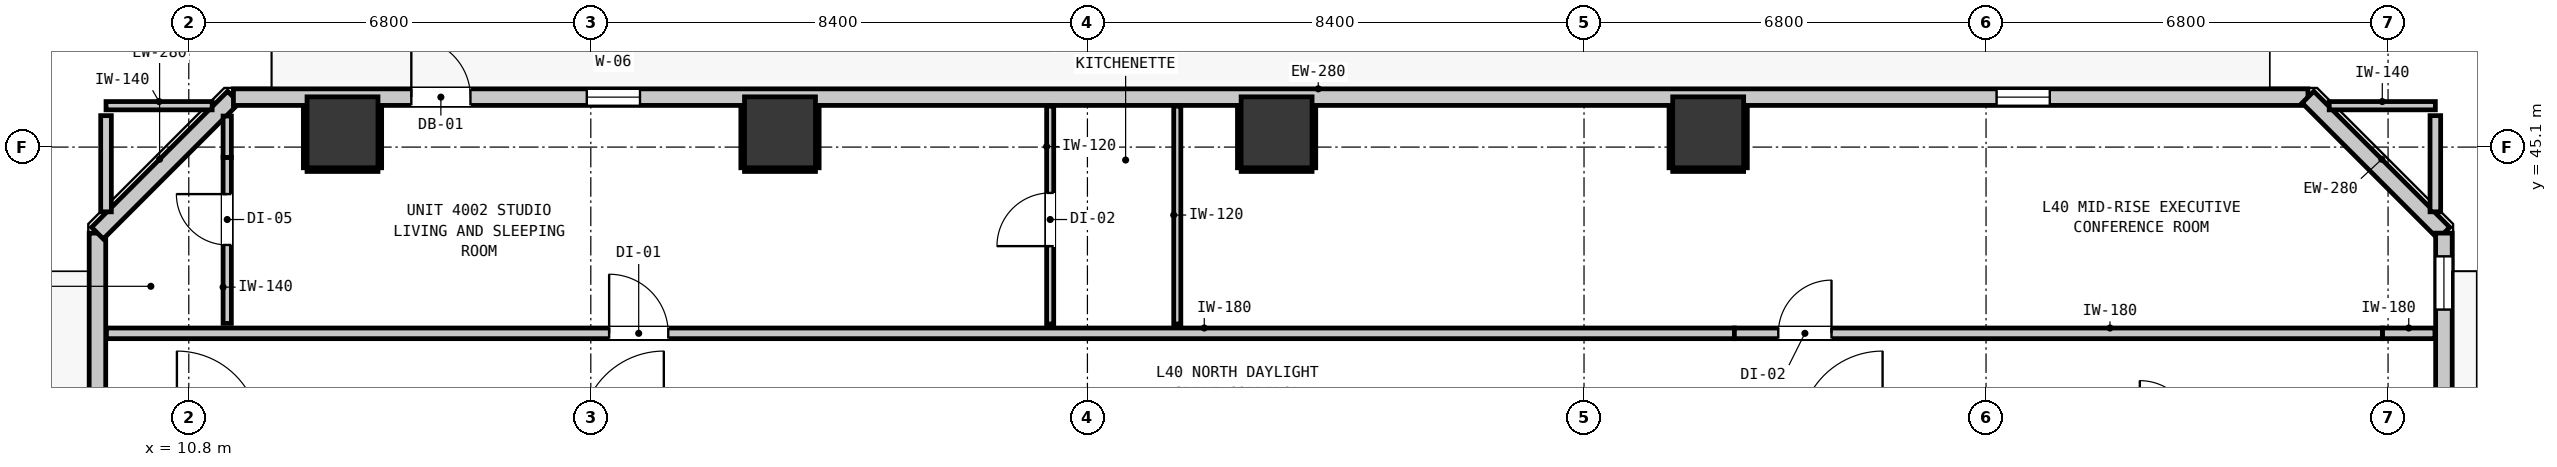
"""IFC4 building model, lengths in metres.
Left out: names, types, materials, properties, quantities, classifications, styles, units other than length and angle.
Written with IfcOpenShell. Run it as: python <this file> out.ifc"""

import sys

from ifc_helpers import new_model, si_unit, direction, frame, frame_2d, origin, origin_2d, place, context, subcontext, project, spatial, rectangle, extrude, element, fill, save


model = new_model("IFC4")
c1 = context("Model", 3, precision=1e-05, world=origin(), true_north=direction((0.0, 1.0)))
c2 = subcontext(c1, "Body", "Model", "MODEL_VIEW")
j1 = project(units=[si_unit("LENGTHUNIT", "METRE"), si_unit("PLANEANGLEUNIT", "RADIAN")], contexts=[c1])
p1 = place(None, origin())
s1 = spatial("IfcSite", under=j1, at=p1, CompositionType="ELEMENT")
p2 = place(p1, origin())
s2 = spatial("IfcBuilding", under=s1, at=p2, CompositionType="ELEMENT")
p3 = place(p2, frame((0.0, 0.0, 139.28)))
s3 = spatial("IfcBuildingStorey", under=s2, at=p3, CompositionType="ELEMENT", Elevation=139.28)
for number, where, z_axis, x_axis in (
    (1, (13.4, 45.35, 0.0), (0.0, 0.0, 1.0), (1.0, 0.0, 0.0)),
    (2, (20.8, 45.35, 0.0), (0.0, 0.0, 1.0), (1.0, 0.0, 0.0)),
    (3, (29.2, 45.35, 0.0), (0.0, 0.0, 1.0), (1.0, 0.0, 0.0)),
    (4, (36.5, 45.35, 0.0), (0.0, 0.0, 1.0), (1.0, 0.0, 0.0)),
):
    element("IfcColumn", number, at=place(p3, frame(where, z_axis=z_axis, x_axis=x_axis)), inside=s3, PredefinedType="COLUMN", context=c2, shape_type="SweptSolid", body=[
        extrude(rectangle(XDim=1.2, YDim=1.2, at=origin_2d()), origin(), (0.0, 0.0, 1.0), 3.32),
    ])
p4 = place(p3, frame((9.255, 11.355, 0.0), z_axis=(0.0, 0.0, 1.0), x_axis=(0.0, 1.0, 0.0)))
e5 = element("IfcWall", 5, at=p4, inside=s3, PredefinedType="STANDARD", context=c2, shape_type="SweptSolid", body=[
    extrude(rectangle(XDim=32.29, YDim=0.28, at=frame_2d((16.145, 0.0))), origin(), (0.0, 0.0, 1.0), 3.08),
])
p5 = place(p4, frame((5.818, 0.0, 0.0)))
e6 = element("IfcOpeningElement", 6, at=p5, cuts=e5, PredefinedType="OPENING", context=c2, shape_type="SweptSolid", body=[
    extrude(rectangle(XDim=1.0, YDim=2.15, at=frame_2d((0.5, 1.075))), frame((0.0, 0.15, 0.0), z_axis=(0.0, -1.0, 0.0), x_axis=(1.0, 0.0, 0.0)), (0.0, 0.0, 1.0), 0.3),
])
p6 = place(p4, frame((0.619, 0.0, 0.85)))
e7 = element("IfcOpeningElement", 7, at=p6, cuts=e5, PredefinedType="OPENING", context=c2, shape_type="SweptSolid", body=[
    extrude(rectangle(XDim=0.9, YDim=1.5, at=frame_2d((0.45, 0.75))), frame((0.0, 0.15, 0.0), z_axis=(0.0, -1.0, 0.0), x_axis=(1.0, 0.0, 0.0)), (0.0, 0.0, 1.0), 0.3),
])
p7 = place(p3, frame((9.255, 43.645, 0.0), z_axis=(0.0, 0.0, 1.0), x_axis=(0.707106781187, 0.707106781187, 0.0)))
e8 = element("IfcWall", 8, at=p7, inside=s3, PredefinedType="STANDARD", context=c2, shape_type="SweptSolid", body=[
    extrude(rectangle(XDim=3.253, YDim=0.28, at=frame_2d((1.626, 0.0))), origin(), (0.0, 0.0, 1.0), 3.08),
])
p8 = place(p3, frame((11.555, 45.945, 0.0), z_axis=(0.0, 0.0, 1.0), x_axis=(1.0, 0.0, 0.0)))
e9 = element("IfcWall", 9, at=p8, inside=s3, PredefinedType="STANDARD", context=c2, shape_type="SweptSolid", body=[
    extrude(rectangle(XDim=35.09, YDim=0.28, at=frame_2d((17.545, 0.0))), origin(), (0.0, 0.0, 1.0), 3.08),
])
p9 = place(p8, frame((3.009, 0.0, 0.0)))
e10 = element("IfcOpeningElement", 10, at=p9, cuts=e9, PredefinedType="OPENING", context=c2, shape_type="SweptSolid", body=[
    extrude(rectangle(XDim=1.0, YDim=2.15, at=frame_2d((0.5, 1.075))), frame((0.0, 0.15, 0.0), z_axis=(0.0, -1.0, 0.0), x_axis=(1.0, 0.0, 0.0)), (0.0, 0.0, 1.0), 0.3),
])
p10 = place(p8, frame((5.977, 0.0, 0.85)))
e11 = element("IfcOpeningElement", 11, at=p10, cuts=e9, PredefinedType="OPENING", context=c2, shape_type="SweptSolid", body=[
    extrude(rectangle(XDim=0.9, YDim=1.5, at=frame_2d((0.45, 0.75))), frame((0.0, 0.15, 0.0), z_axis=(0.0, -1.0, 0.0), x_axis=(1.0, 0.0, 0.0)), (0.0, 0.0, 1.0), 0.3),
])
p11 = place(p8, frame((29.823, 0.0, 0.85)))
e12 = element("IfcOpeningElement", 12, at=p11, cuts=e9, PredefinedType="OPENING", context=c2, shape_type="SweptSolid", body=[
    extrude(rectangle(XDim=0.9, YDim=1.5, at=frame_2d((0.45, 0.75))), frame((0.0, 0.15, 0.0), z_axis=(0.0, -1.0, 0.0), x_axis=(1.0, 0.0, 0.0)), (0.0, 0.0, 1.0), 0.3),
])
p12 = place(p3, frame((46.645, 45.945, 0.0), z_axis=(0.0, 0.0, 1.0), x_axis=(0.707106781187, -0.707106781187, 0.0)))
e13 = element("IfcWall", 13, at=p12, inside=s3, PredefinedType="STANDARD", context=c2, shape_type="SweptSolid", body=[
    extrude(rectangle(XDim=3.253, YDim=0.28, at=frame_2d((1.626, 0.0))), origin(), (0.0, 0.0, 1.0), 3.08),
])
p13 = place(p3, frame((48.945, 43.645, 0.0), z_axis=(0.0, 0.0, 1.0), x_axis=(0.0, -1.0, 0.0)))
e14 = element("IfcWall", 14, at=p13, inside=s3, PredefinedType="STANDARD", context=c2, shape_type="SweptSolid", body=[
    extrude(rectangle(XDim=32.29, YDim=0.28, at=frame_2d((16.145, 0.0))), origin(), (0.0, 0.0, 1.0), 3.08),
])
p14 = place(p13, frame((5.467, 0.0, 0.0)))
e15 = element("IfcOpeningElement", 15, at=p14, cuts=e14, PredefinedType="OPENING", context=c2, shape_type="SweptSolid", body=[
    extrude(rectangle(XDim=1.0, YDim=2.15, at=frame_2d((0.5, 1.075))), frame((0.0, 0.15, 0.0), z_axis=(0.0, -1.0, 0.0), x_axis=(1.0, 0.0, 0.0)), (0.0, 0.0, 1.0), 0.3),
])
p15 = place(p13, frame((29.148, 0.0, 0.85)))
e16 = element("IfcOpeningElement", 16, at=p15, cuts=e14, PredefinedType="OPENING", context=c2, shape_type="SweptSolid", body=[
    extrude(rectangle(XDim=0.9, YDim=1.5, at=frame_2d((0.45, 0.75))), frame((0.0, 0.15, 0.0), z_axis=(0.0, -1.0, 0.0), x_axis=(1.0, 0.0, 0.0)), (0.0, 0.0, 1.0), 0.3),
])
p16 = place(p13, frame((0.393, 0.0, 0.85)))
e17 = element("IfcOpeningElement", 17, at=p16, cuts=e14, PredefinedType="OPENING", context=c2, shape_type="SweptSolid", body=[
    extrude(rectangle(XDim=0.9, YDim=1.5, at=frame_2d((0.45, 0.75))), frame((0.0, 0.15, 0.0), z_axis=(0.0, -1.0, 0.0), x_axis=(1.0, 0.0, 0.0)), (0.0, 0.0, 1.0), 0.3),
])
p17 = place(p13, frame((16.276, 0.0, 0.85)))
e18 = element("IfcOpeningElement", 18, at=p17, cuts=e14, PredefinedType="OPENING", context=c2, shape_type="SweptSolid", body=[
    extrude(rectangle(XDim=0.9, YDim=1.5, at=frame_2d((0.45, 0.75))), frame((0.0, 0.15, 0.0), z_axis=(0.0, -1.0, 0.0), x_axis=(1.0, 0.0, 0.0)), (0.0, 0.0, 1.0), 0.3),
])
p18 = place(p13, frame((10.645, 0.0, 0.85)))
e19 = element("IfcOpeningElement", 19, at=p18, cuts=e14, PredefinedType="OPENING", context=c2, shape_type="SweptSolid", body=[
    extrude(rectangle(XDim=0.9, YDim=1.5, at=frame_2d((0.45, 0.75))), frame((0.0, 0.15, 0.0), z_axis=(0.0, -1.0, 0.0), x_axis=(1.0, 0.0, 0.0)), (0.0, 0.0, 1.0), 0.3),
])
p19 = place(p3, frame((9.407, 41.95, 0.0), z_axis=(0.0, 0.0, 1.0), x_axis=(1.0, 0.0, 0.0)))
e20 = element("IfcWall", 20, at=p19, inside=s3, PredefinedType="PARTITIONING", context=c2, shape_type="SweptSolid", body=[
    extrude(rectangle(XDim=27.536, YDim=0.18, at=frame_2d((13.768, 0.0))), origin(), (0.0, 0.0, 1.0), 3.08),
])
p20 = place(p19, frame((8.503, 0.0, 0.0)))
e21 = element("IfcOpeningElement", 21, at=p20, cuts=e20, PredefinedType="OPENING", context=c2, shape_type="SweptSolid", body=[
    extrude(rectangle(XDim=1.0, YDim=2.15, at=frame_2d((0.5, 1.075))), frame((0.0, 0.1, 0.0), z_axis=(0.0, -1.0, 0.0), x_axis=(1.0, 0.0, 0.0)), (0.0, 0.0, 1.0), 0.2),
])
p21 = place(p3, frame((36.943, 41.95, 0.0), z_axis=(0.0, 0.0, 1.0), x_axis=(1.0, 0.0, 0.0)))
e22 = element("IfcWall", 22, at=p21, inside=s3, PredefinedType="PARTITIONING", context=c2, shape_type="SweptSolid", body=[
    extrude(rectangle(XDim=10.964, YDim=0.18, at=frame_2d((5.482, 0.0))), origin(), (0.0, 0.0, 1.0), 2.565),
])
p22 = place(p21, frame((0.743, 0.0, 0.0)))
e23 = element("IfcOpeningElement", 23, at=p22, cuts=e22, PredefinedType="OPENING", context=c2, shape_type="SweptSolid", body=[
    extrude(rectangle(XDim=0.9, YDim=2.1, at=frame_2d((0.45, 1.05))), frame((0.0, 0.1, 0.0), z_axis=(0.0, -1.0, 0.0), x_axis=(1.0, 0.0, 0.0)), (0.0, 0.0, 1.0), 0.2),
])
p23 = place(p3, frame((47.907, 41.95, 0.0), z_axis=(0.0, 0.0, 1.0), x_axis=(1.0, 0.0, 0.0)))
e24 = element("IfcWall", 24, at=p23, inside=s3, PredefinedType="PARTITIONING", context=c2, shape_type="SweptSolid", body=[
    extrude(rectangle(XDim=0.886, YDim=0.18, at=frame_2d((0.443, 0.0))), origin(), (0.0, 0.0, 1.0), 3.08),
])
for number, where, z_axis, x_axis in (
    (25, (9.4, 45.8, 0.0), (0.0, 0.0, 1.0), (1.0, 0.0, 0.0)),
    (26, (47.005, 45.8, 0.0), (0.0, 0.0, 1.0), (1.0, 0.0, 0.0)),
):
    element("IfcWall", number, at=place(p3, frame(where, z_axis=z_axis, x_axis=x_axis)), inside=s3, PredefinedType="PARTITIONING", context=c2, shape_type="SweptSolid", body=[
        extrude(rectangle(XDim=1.795, YDim=0.14, at=frame_2d((0.897, 0.0))), origin(), (0.0, 0.0, 1.0), 3.08),
    ])
for number, where, z_axis, x_axis in (
    (27, (9.4, 44.005, 0.0), (0.0, 0.0, 1.0), (0.0, 1.0, 0.0)),
    (28, (48.8, 44.005, 0.0), (0.0, 0.0, 1.0), (0.0, 1.0, 0.0)),
):
    element("IfcWall", number, at=place(p3, frame(where, z_axis=z_axis, x_axis=x_axis)), inside=s3, PredefinedType="PARTITIONING", context=c2, shape_type="SweptSolid", body=[
        extrude(rectangle(XDim=1.627, YDim=0.18, at=frame_2d((0.813, 0.0))), origin(), (0.0, 0.0, 1.0), 3.08),
    ])
p24 = place(p3, frame((11.45, 42.118, 0.0), z_axis=(0.0, 0.0, 1.0), x_axis=(0.0, 1.0, 0.0)))
e29 = element("IfcWall", 29, at=p24, inside=s3, PredefinedType="PARTITIONING", context=c2, shape_type="SweptSolid", body=[
    extrude(rectangle(XDim=2.808, YDim=0.14, at=frame_2d((1.404, 0.0))), origin(), (0.0, 0.0, 1.0), 2.565),
])
p25 = place(p24, frame((1.327, 0.0, 0.0)))
e30 = element("IfcOpeningElement", 30, at=p25, cuts=e29, PredefinedType="OPENING", context=c2, shape_type="SweptSolid", body=[
    extrude(rectangle(XDim=0.86, YDim=2.02, at=frame_2d((0.43, 1.01))), frame((0.0, 0.08, 0.0), z_axis=(0.0, -1.0, 0.0), x_axis=(1.0, 0.0, 0.0)), (0.0, 0.0, 1.0), 0.16),
])
p26 = place(p3, frame((11.45, 44.926, 0.0), z_axis=(0.0, 0.0, 1.0), x_axis=(0.0, 1.0, 0.0)))
e31 = element("IfcWall", 31, at=p26, inside=s3, PredefinedType="PARTITIONING", context=c2, shape_type="SweptSolid", body=[
    extrude(rectangle(XDim=0.699, YDim=0.14, at=frame_2d((0.35, 0.0))), origin(), (0.0, 0.0, 1.0), 3.08),
])
p27 = place(p3, frame((25.37, 42.108, 0.0), z_axis=(0.0, 0.0, 1.0), x_axis=(0.0, 1.0, 0.0)))
e32 = element("IfcWall", 32, at=p27, inside=s3, PredefinedType="PARTITIONING", context=c2, shape_type="SweptSolid", body=[
    extrude(rectangle(XDim=3.685, YDim=0.12, at=frame_2d((1.843, 0.0))), origin(), (0.0, 0.0, 1.0), 3.08),
])
p28 = place(p27, frame((1.317, 0.0, 0.0)))
e33 = element("IfcOpeningElement", 33, at=p28, cuts=e32, PredefinedType="OPENING", context=c2, shape_type="SweptSolid", body=[
    extrude(rectangle(XDim=0.9, YDim=2.1, at=frame_2d((0.45, 1.05))), frame((0.0, 0.07, 0.0), z_axis=(0.0, -1.0, 0.0), x_axis=(1.0, 0.0, 0.0)), (0.0, 0.0, 1.0), 0.14),
])
p29 = place(p3, frame((27.52, 42.108, 0.0), z_axis=(0.0, 0.0, 1.0), x_axis=(0.0, 1.0, 0.0)))
e34 = element("IfcWall", 34, at=p29, inside=s3, PredefinedType="PARTITIONING", context=c2, shape_type="SweptSolid", body=[
    extrude(rectangle(XDim=3.685, YDim=0.12, at=frame_2d((1.843, 0.0))), origin(), (0.0, 0.0, 1.0), 3.08),
])
p30 = place(p3, frame((12.8, 44.718, 0.0), z_axis=(0.0, 0.0, 1.0), x_axis=(1.0, 0.0, 0.0)))
e35 = element("IfcWall", 35, at=p30, inside=s3, PredefinedType="PARTITIONING", context=c2, shape_type="SweptSolid", body=[
    extrude(rectangle(XDim=1.2, YDim=0.06, at=frame_2d((0.6, 0.0))), origin(), (0.0, 0.0, 1.0), 1.45),
])
for number, where, z_axis, x_axis in (
    (36, (12.768, 44.75, 0.0), (0.0, 0.0, 1.0), (0.0, 1.0, 0.0)),
    (37, (14.032, 44.75, 0.0), (0.0, 0.0, 1.0), (0.0, 1.0, 0.0)),
):
    element("IfcWall", number, at=place(p3, frame(where, z_axis=z_axis, x_axis=x_axis)), inside=s3, PredefinedType="PARTITIONING", context=c2, shape_type="SweptSolid", body=[
        extrude(rectangle(XDim=1.04, YDim=0.06, at=frame_2d((0.52, 0.0))), origin(), (0.0, 0.0, 1.0), 1.45),
    ])
p31 = place(p3, frame((20.2, 44.718, 0.0), z_axis=(0.0, 0.0, 1.0), x_axis=(1.0, 0.0, 0.0)))
e38 = element("IfcWall", 38, at=p31, inside=s3, PredefinedType="PARTITIONING", context=c2, shape_type="SweptSolid", body=[
    extrude(rectangle(XDim=1.2, YDim=0.06, at=frame_2d((0.6, 0.0))), origin(), (0.0, 0.0, 1.0), 1.45),
])
for number, where, z_axis, x_axis in (
    (39, (20.168, 44.75, 0.0), (0.0, 0.0, 1.0), (0.0, 1.0, 0.0)),
    (40, (21.432, 44.75, 0.0), (0.0, 0.0, 1.0), (0.0, 1.0, 0.0)),
):
    element("IfcWall", number, at=place(p3, frame(where, z_axis=z_axis, x_axis=x_axis)), inside=s3, PredefinedType="PARTITIONING", context=c2, shape_type="SweptSolid", body=[
        extrude(rectangle(XDim=1.04, YDim=0.06, at=frame_2d((0.52, 0.0))), origin(), (0.0, 0.0, 1.0), 1.45),
    ])
p32 = place(p3, frame((28.6, 44.718, 0.0), z_axis=(0.0, 0.0, 1.0), x_axis=(1.0, 0.0, 0.0)))
e41 = element("IfcWall", 41, at=p32, inside=s3, PredefinedType="PARTITIONING", context=c2, shape_type="SweptSolid", body=[
    extrude(rectangle(XDim=1.2, YDim=0.06, at=frame_2d((0.6, 0.0))), origin(), (0.0, 0.0, 1.0), 1.45),
])
for number, where, z_axis, x_axis in (
    (42, (28.568, 44.75, 0.0), (0.0, 0.0, 1.0), (0.0, 1.0, 0.0)),
    (43, (29.832, 44.75, 0.0), (0.0, 0.0, 1.0), (0.0, 1.0, 0.0)),
):
    element("IfcWall", number, at=place(p3, frame(where, z_axis=z_axis, x_axis=x_axis)), inside=s3, PredefinedType="PARTITIONING", context=c2, shape_type="SweptSolid", body=[
        extrude(rectangle(XDim=1.04, YDim=0.06, at=frame_2d((0.52, 0.0))), origin(), (0.0, 0.0, 1.0), 1.45),
    ])
p33 = place(p3, frame((35.9, 44.718, 0.0), z_axis=(0.0, 0.0, 1.0), x_axis=(1.0, 0.0, 0.0)))
e44 = element("IfcWall", 44, at=p33, inside=s3, PredefinedType="PARTITIONING", context=c2, shape_type="SweptSolid", body=[
    extrude(rectangle(XDim=1.2, YDim=0.06, at=frame_2d((0.6, 0.0))), origin(), (0.0, 0.0, 1.0), 1.45),
])
for number, where, z_axis, x_axis in (
    (45, (35.868, 44.75, 0.0), (0.0, 0.0, 1.0), (0.0, 1.0, 0.0)),
    (46, (37.132, 44.75, 0.0), (0.0, 0.0, 1.0), (0.0, 1.0, 0.0)),
):
    element("IfcWall", number, at=place(p3, frame(where, z_axis=z_axis, x_axis=x_axis)), inside=s3, PredefinedType="PARTITIONING", context=c2, shape_type="SweptSolid", body=[
        extrude(rectangle(XDim=1.04, YDim=0.06, at=frame_2d((0.52, 0.0))), origin(), (0.0, 0.0, 1.0), 1.45),
    ])
p34 = place(p9, origin())
e47 = element("IfcDoor", 47, at=p34, inside=s3, OperationType="SINGLE_SWING_LEFT", PredefinedType="DOOR", context=c2, shape_type="SweptSolid", body=[
    extrude(rectangle(XDim=1.0, YDim=2.15, at=frame_2d((0.5, 1.075))), frame((0.0, 0.025, 0.0), z_axis=(0.0, -1.0, 0.0), x_axis=(1.0, 0.0, 0.0)), (0.0, 0.0, 1.0), 0.05),
])
fill(e10, e47)
p35 = place(p10, origin())
e48 = element("IfcWindow", 48, at=p35, inside=s3, PartitioningType="SINGLE_PANEL", PredefinedType="WINDOW", context=c2, shape_type="SweptSolid", body=[
    extrude(rectangle(XDim=0.9, YDim=1.5, at=frame_2d((0.45, 0.75))), frame((0.0, 0.03, 0.0), z_axis=(0.0, -1.0, 0.0), x_axis=(1.0, 0.0, 0.0)), (0.0, 0.0, 1.0), 0.06),
])
fill(e11, e48)
p36 = place(p11, origin())
e49 = element("IfcWindow", 49, at=p36, inside=s3, PartitioningType="SINGLE_PANEL", PredefinedType="WINDOW", context=c2, shape_type="SweptSolid", body=[
    extrude(rectangle(XDim=0.9, YDim=1.5, at=frame_2d((0.45, 0.75))), frame((0.0, 0.03, 0.0), z_axis=(0.0, -1.0, 0.0), x_axis=(1.0, 0.0, 0.0)), (0.0, 0.0, 1.0), 0.06),
])
fill(e12, e49)
p37 = place(p16, origin())
e50 = element("IfcWindow", 50, at=p37, inside=s3, PartitioningType="SINGLE_PANEL", PredefinedType="WINDOW", context=c2, shape_type="SweptSolid", body=[
    extrude(rectangle(XDim=0.9, YDim=1.5, at=frame_2d((0.45, 0.75))), frame((0.0, 0.03, 0.0), z_axis=(0.0, -1.0, 0.0), x_axis=(1.0, 0.0, 0.0)), (0.0, 0.0, 1.0), 0.06),
])
fill(e17, e50)
p38 = place(p20, origin())
e51 = element("IfcDoor", 51, at=p38, inside=s3, OperationType="SINGLE_SWING_LEFT", PredefinedType="DOOR", context=c2, shape_type="SweptSolid", body=[
    extrude(rectangle(XDim=1.0, YDim=2.15, at=frame_2d((0.5, 1.075))), frame((0.0, 0.025, 0.0), z_axis=(0.0, -1.0, 0.0), x_axis=(1.0, 0.0, 0.0)), (0.0, 0.0, 1.0), 0.05),
])
fill(e21, e51)
p39 = place(p25, origin())
e52 = element("IfcDoor", 52, at=p39, inside=s3, OperationType="SINGLE_SWING_RIGHT", PredefinedType="DOOR", context=c2, shape_type="SweptSolid", body=[
    extrude(rectangle(XDim=0.86, YDim=2.02, at=frame_2d((0.43, 1.01))), frame((0.0, 0.025, 0.0), z_axis=(0.0, -1.0, 0.0), x_axis=(1.0, 0.0, 0.0)), (0.0, 0.0, 1.0), 0.05),
])
fill(e30, e52)
p40 = place(p28, origin())
e53 = element("IfcDoor", 53, at=p40, inside=s3, OperationType="SINGLE_SWING_LEFT", PredefinedType="DOOR", context=c2, shape_type="SweptSolid", body=[
    extrude(rectangle(XDim=0.9, YDim=2.1, at=frame_2d((0.45, 1.05))), frame((0.0, 0.025, 0.0), z_axis=(0.0, -1.0, 0.0), x_axis=(1.0, 0.0, 0.0)), (0.0, 0.0, 1.0), 0.05),
])
fill(e33, e53)
p41 = place(p22, origin())
e54 = element("IfcDoor", 54, at=p41, inside=s3, OperationType="SINGLE_SWING_RIGHT", PredefinedType="DOOR", context=c2, shape_type="SweptSolid", body=[
    extrude(rectangle(XDim=0.9, YDim=2.1, at=frame_2d((0.45, 1.05))), frame((0.0, 0.025, 0.0), z_axis=(0.0, -1.0, 0.0), x_axis=(1.0, 0.0, 0.0)), (0.0, 0.0, 1.0), 0.05),
])
fill(e23, e54)
save(model, sys.argv[1])
